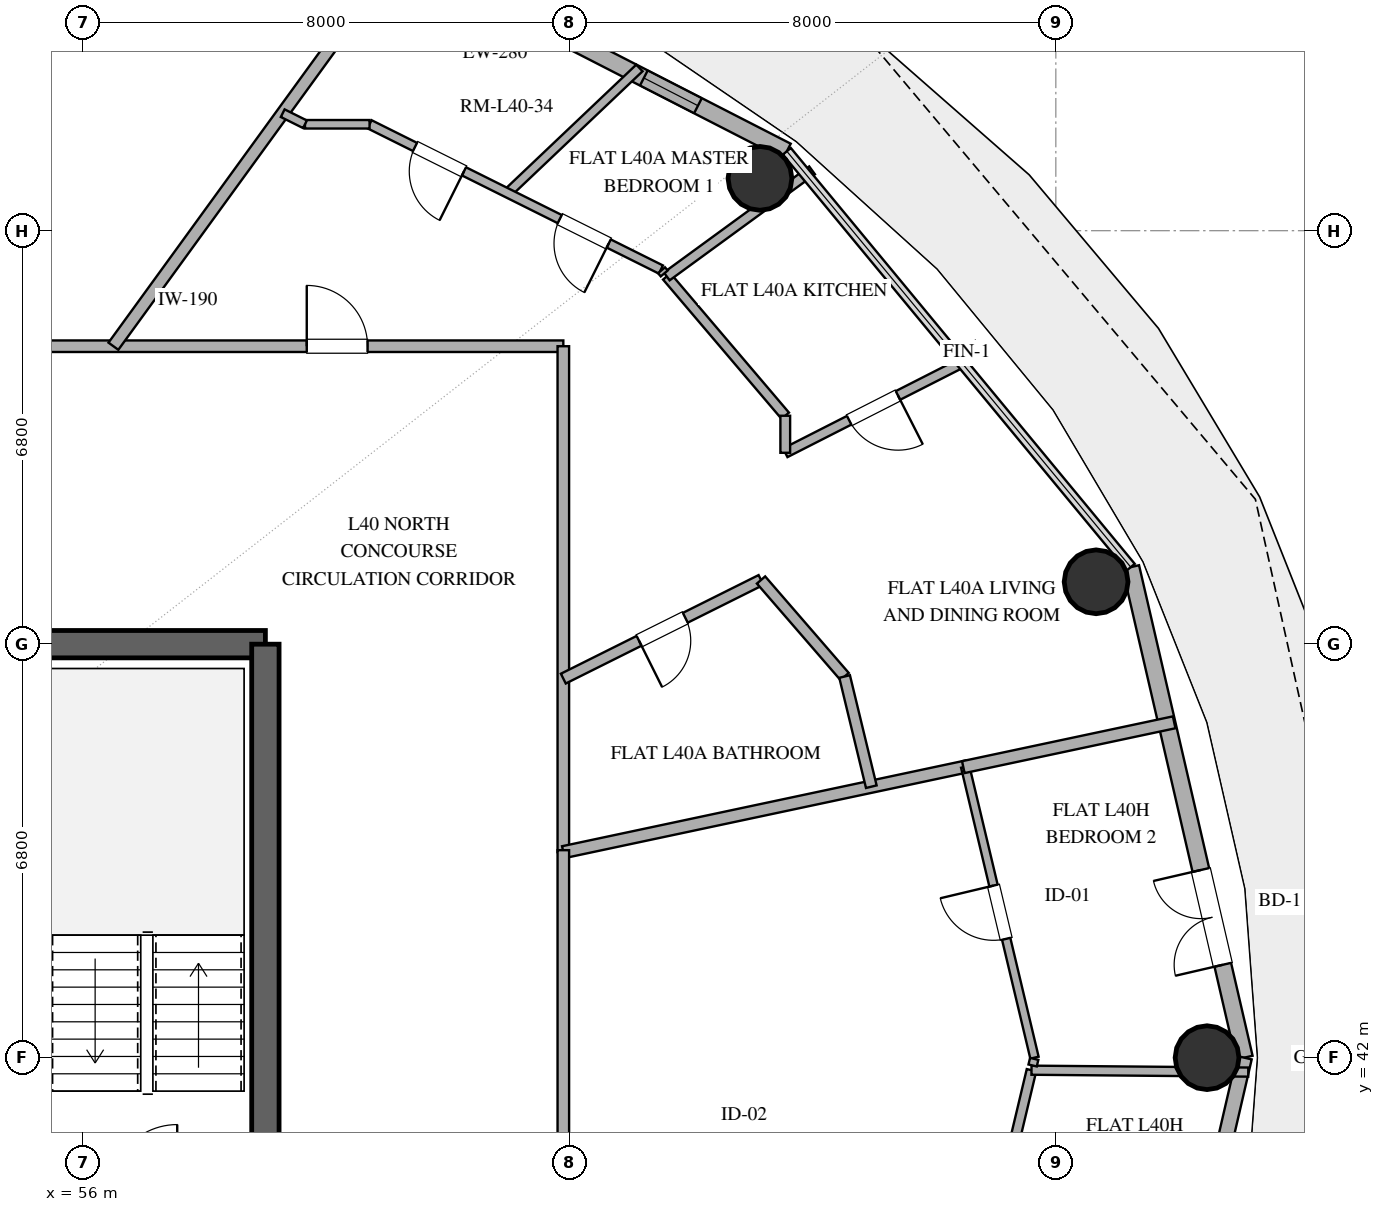
"""IFC4 building model, lengths in metres.
Left out: names, types, materials, properties, quantities, classifications, styles, units other than length and angle.
Written with IfcOpenShell. Run it as: python <this file> out.ifc"""

import sys

from ifc_helpers import new_model, si_unit, direction, frame, frame_2d, origin, origin_2d, place, context, subcontext, project, spatial, rectangle, hollow_circle, extrude, element, fill, save


model = new_model("IFC4")
c1 = context("Model", 3, precision=1e-05, world=origin(), true_north=direction((0.0, 1.0)))
c2 = subcontext(c1, "Body", "Model", "MODEL_VIEW")
j1 = project(units=[si_unit("LENGTHUNIT", "METRE"), si_unit("PLANEANGLEUNIT", "RADIAN")], contexts=[c1])
p1 = place(None, origin())
s1 = spatial("IfcSite", under=j1, at=p1, CompositionType="ELEMENT")
p2 = place(p1, origin())
s2 = spatial("IfcBuilding", under=s1, at=p2, CompositionType="ELEMENT")
p3 = place(p2, frame((0.0, 0.0, 161.4)))
s3 = spatial("IfcBuildingStorey", under=s2, at=p3, CompositionType="ELEMENT", Elevation=161.4)
p4 = place(p3, frame((55.0, 48.8, 0.0), z_axis=(0.0, 0.0, 1.0), x_axis=(1.0, 0.0, 0.0)))
e1 = element("IfcWall", 1, at=p4, inside=s3, PredefinedType="SHEAR", context=c2, shape_type="SweptSolid", body=[
    extrude(rectangle(XDim=4.0, YDim=0.45, at=frame_2d((2.0, 0.0))), origin(), (0.0, 0.0, 1.0), 3.38),
])
p5 = place(p3, frame((59.0, 35.2, 0.0), z_axis=(0.0, 0.0, 1.0), x_axis=(0.0, 1.0, 0.0)))
e2 = element("IfcWall", 2, at=p5, inside=s3, PredefinedType="SHEAR", context=c2, shape_type="SweptSolid", body=[
    extrude(rectangle(XDim=13.6, YDim=0.45, at=frame_2d((6.8, 0.0))), origin(), (0.0, 0.0, 1.0), 3.38),
])
for number, where, z_axis, x_axis in (
    (3, (74.487, 42.0, 0.0), (0.0, 0.0, 1.0), (1.0, 0.0, 0.0)),
    (4, (72.662, 49.826, 0.0), (0.0, 0.0, 1.0), (1.0, 0.0, 0.0)),
    (5, (67.134, 56.46, 0.0), (0.0, 0.0, 1.0), (1.0, 0.0, 0.0)),
):
    element("IfcColumn", number, at=place(p3, frame(where, z_axis=z_axis, x_axis=x_axis)), inside=s3, PredefinedType="COLUMN", context=c2, shape_type="SweptSolid", body=[
        extrude(hollow_circle(Radius=0.525, WallThickness=0.028, at=origin_2d()), origin(), (0.0, 0.0, 1.0), 3.38),
    ])
p6 = place(p3, frame((75.099, 42.0, 0.0), z_axis=(0.0, 0.0, 1.0), x_axis=(-0.225473184558, 0.974249374157, 0.0)))
e6 = element("IfcWall", 6, at=p6, inside=s3, PredefinedType="SOLIDWALL", context=c2, shape_type="SweptSolid", body=[
    extrude(rectangle(XDim=8.28, YDim=0.28, at=frame_2d((4.14, 0.0))), origin(), (0.0, 0.0, 1.0), 3.38),
])
p7 = place(p6, frame((1.568, 0.0, 0.0)))
e7 = element("IfcOpeningElement", 7, at=p7, cuts=e6, PredefinedType="OPENING", context=c2, shape_type="SweptSolid", body=[
    extrude(rectangle(XDim=1.6, YDim=2.25, at=frame_2d((0.8, 1.125))), frame((0.0, 0.15, 0.0), z_axis=(0.0, -1.0, 0.0), x_axis=(1.0, 0.0, 0.0)), (0.0, 0.0, 1.0), 0.3),
])
p8 = place(p3, frame((67.576, 56.906, 0.0), z_axis=(0.0, 0.0, 1.0), x_axis=(-0.889872523182, 0.456209263919, 0.0)))
e8 = element("IfcWall", 8, at=p8, inside=s3, PredefinedType="SOLIDWALL", context=c2, shape_type="SweptSolid", body=[
    extrude(rectangle(XDim=10.016, YDim=0.28, at=frame_2d((5.008, 0.0))), origin(), (0.0, 0.0, 1.0), 3.38),
])
p9 = place(p8, frame((4.213, 0.0, 0.85)))
e9 = element("IfcOpeningElement", 9, at=p9, cuts=e8, PredefinedType="OPENING", context=c2, shape_type="SweptSolid", body=[
    extrude(rectangle(XDim=1.5, YDim=2.0, at=frame_2d((0.75, 1.0))), frame((0.0, 0.15, 0.0), z_axis=(0.0, -1.0, 0.0), x_axis=(1.0, 0.0, 0.0)), (0.0, 0.0, 1.0), 0.3),
])
p10 = place(p8, frame((7.479, 0.0, 0.85)))
e10 = element("IfcOpeningElement", 10, at=p10, cuts=e8, PredefinedType="OPENING", context=c2, shape_type="SweptSolid", body=[
    extrude(rectangle(XDim=1.0, YDim=1.8, at=frame_2d((0.5, 0.9))), frame((0.0, 0.15, 0.0), z_axis=(0.0, -1.0, 0.0), x_axis=(1.0, 0.0, 0.0)), (0.0, 0.0, 1.0), 0.3),
])
p11 = place(p8, frame((1.643, 0.0, 0.85)))
e11 = element("IfcOpeningElement", 11, at=p11, cuts=e8, PredefinedType="OPENING", context=c2, shape_type="SweptSolid", body=[
    extrude(rectangle(XDim=1.0, YDim=1.8, at=frame_2d((0.5, 0.9))), frame((0.0, 0.15, 0.0), z_axis=(0.0, -1.0, 0.0), x_axis=(1.0, 0.0, 0.0)), (0.0, 0.0, 1.0), 0.3),
])
p12 = place(p3, frame((73.232, 33.933, 0.0), z_axis=(0.0, 0.0, 1.0), x_axis=(0.225473184558, 0.974249374157, 0.0)))
e12 = element("IfcWall", 12, at=p12, inside=s3, PredefinedType="SOLIDWALL", context=c2, shape_type="SweptSolid", body=[
    extrude(rectangle(XDim=8.28, YDim=0.25, at=frame_2d((4.14, 0.0))), origin(), (0.0, 0.0, 1.0), 3.38),
])
p13 = place(p12, frame((4.821, 0.0, 0.35)))
e13 = element("IfcOpeningElement", 13, at=p13, cuts=e12, PredefinedType="OPENING", context=c2, shape_type="SweptSolid", body=[
    extrude(rectangle(XDim=1.0, YDim=1.05, at=frame_2d((0.5, 0.525))), frame((0.0, 0.135, 0.0), z_axis=(0.0, -1.0, 0.0), x_axis=(1.0, 0.0, 0.0)), (0.0, 0.0, 1.0), 0.27),
])
p14 = place(p3, frame((51.543, 53.7, 0.0), z_axis=(0.0, 0.0, 1.0), x_axis=(1.0, 0.0, 0.0)))
e14 = element("IfcWall", 14, at=p14, inside=s3, PredefinedType="PARTITIONING", context=c2, shape_type="SweptSolid", body=[
    extrude(rectangle(XDim=12.356, YDim=0.19, at=frame_2d((6.178, 0.0))), origin(), (0.0, 0.0, 1.0), 2.74),
])
p15 = place(p14, frame((8.137, 0.0, 0.0)))
e15 = element("IfcOpeningElement", 15, at=p15, cuts=e14, PredefinedType="OPENING", context=c2, shape_type="SweptSolid", body=[
    extrude(rectangle(XDim=1.0, YDim=2.2, at=frame_2d((0.5, 1.1))), frame((0.0, 0.105, 0.0), z_axis=(0.0, -1.0, 0.0), x_axis=(1.0, 0.0, 0.0)), (0.0, 0.0, 1.0), 0.21),
])
p16 = place(p14, frame((1.998, 0.0, 0.0)))
e16 = element("IfcOpeningElement", 16, at=p16, cuts=e14, PredefinedType="OPENING", context=c2, shape_type="SweptSolid", body=[
    extrude(rectangle(XDim=1.0, YDim=2.2, at=frame_2d((0.5, 1.1))), frame((0.0, 0.105, 0.0), z_axis=(0.0, -1.0, 0.0), x_axis=(1.0, 0.0, 0.0)), (0.0, 0.0, 1.0), 0.21),
])
p17 = place(p3, frame((63.9, 53.7, 0.0), z_axis=(0.0, 0.0, 1.0), x_axis=(0.0, -1.0, 0.0)))
e17 = element("IfcWall", 17, at=p17, inside=s3, PredefinedType="PARTITIONING", context=c2, shape_type="SweptSolid", body=[
    extrude(rectangle(XDim=8.32, YDim=0.19, at=frame_2d((4.16, 0.0))), origin(), (0.0, 0.0, 1.0), 2.74),
])
p18 = place(p3, frame((63.9, 45.38, 0.0), z_axis=(0.0, 0.0, 1.0), x_axis=(0.978145779981, 0.207920256603, 0.0)))
e18 = element("IfcWall", 18, at=p18, inside=s3, PredefinedType="PARTITIONING", context=c2, shape_type="SweptSolid", body=[
    extrude(rectangle(XDim=6.789, YDim=0.2, at=frame_2d((3.395, 0.0))), origin(), (0.0, 0.0, 1.0), 2.74),
])
p19 = place(p3, frame((63.9, 45.412, 0.0), z_axis=(0.0, 0.0, 1.0), x_axis=(0.0, -1.0, 0.0)))
e19 = element("IfcWall", 19, at=p19, inside=s3, PredefinedType="PARTITIONING", context=c2, shape_type="SweptSolid", body=[
    extrude(rectangle(XDim=4.987, YDim=0.19, at=frame_2d((2.494, 0.0))), origin(), (0.0, 0.0, 1.0), 2.74),
])
p20 = place(p3, frame((71.649, 42.0, 0.0), z_axis=(0.0, 0.0, 1.0), x_axis=(-0.231622764326, 0.972805682059, 0.0)))
e20 = element("IfcWall", 20, at=p20, inside=s3, PredefinedType="PARTITIONING", context=c2, shape_type="SweptSolid", body=[
    extrude(rectangle(XDim=4.918, YDim=0.14, at=frame_2d((2.459, 0.0))), origin(), (0.0, 0.0, 1.0), 2.74),
])
p21 = place(p20, frame((2.009, 0.0, 0.0)))
e21 = element("IfcOpeningElement", 21, at=p21, cuts=e20, PredefinedType="OPENING", context=c2, shape_type="SweptSolid", body=[
    extrude(rectangle(XDim=0.9, YDim=2.1, at=frame_2d((0.45, 1.05))), frame((0.0, 0.08, 0.0), z_axis=(0.0, -1.0, 0.0), x_axis=(1.0, 0.0, 0.0)), (0.0, 0.0, 1.0), 0.16),
])
p22 = place(p3, frame((61.274, 60.27, 0.0), z_axis=(0.0, 0.0, 1.0), x_axis=(-0.587785528328, -0.809016793823, 0.0)))
e22 = element("IfcWall", 22, at=p22, inside=s3, PredefinedType="PARTITIONING", context=c2, shape_type="SweptSolid", body=[
    extrude(rectangle(XDim=8.121, YDim=0.2, at=frame_2d((4.061, 0.0))), origin(), (0.0, 0.0, 1.0), 2.74),
])
p23 = place(p3, frame((67.152, 49.856, 0.0), z_axis=(0.0, 0.0, 1.0), x_axis=(-0.894843352961, -0.446380301605, 0.0)))
e23 = element("IfcWall", 23, at=p23, inside=s3, PredefinedType="PLUMBINGWALL", context=c2, shape_type="SweptSolid", body=[
    extrude(rectangle(XDim=3.634, YDim=0.18, at=frame_2d((1.817, 0.0))), origin(), (0.0, 0.0, 1.0), 2.74),
])
p24 = place(p23, frame((1.392, 0.0, 0.0)))
e24 = element("IfcOpeningElement", 24, at=p24, cuts=e23, PredefinedType="OPENING", context=c2, shape_type="SweptSolid", body=[
    extrude(rectangle(XDim=0.85, YDim=2.1, at=frame_2d((0.425, 1.05))), frame((0.0, 0.1, 0.0), z_axis=(0.0, -1.0, 0.0), x_axis=(1.0, 0.0, 0.0)), (0.0, 0.0, 1.0), 0.2),
])
p25 = place(p3, frame((70.019, 35.158, 0.0), z_axis=(0.0, 0.0, 1.0), x_axis=(0.231657621012, 0.972797382103, 0.0)))
e25 = element("IfcWall", 25, at=p25, inside=s3, PredefinedType="PLUMBINGWALL", context=c2, shape_type="SweptSolid", body=[
    extrude(rectangle(XDim=6.822, YDim=0.16, at=frame_2d((3.411, 0.0))), origin(), (0.0, 0.0, 1.0), 2.74),
])
p26 = place(p25, frame((4.567, 0.0, 0.0)))
e26 = element("IfcOpeningElement", 26, at=p26, cuts=e25, PredefinedType="OPENING", context=c2, shape_type="SweptSolid", body=[
    extrude(rectangle(XDim=0.9, YDim=2.1, at=frame_2d((0.45, 1.05))), frame((0.0, 0.09, 0.0), z_axis=(0.0, -1.0, 0.0), x_axis=(1.0, 0.0, 0.0)), (0.0, 0.0, 1.0), 0.18),
])
p27 = place(p3, frame((75.165, 41.763, 0.0), z_axis=(0.0, 0.0, 1.0), x_axis=(-0.999962184605, 0.00869651424, 0.0)))
e27 = element("IfcWall", 27, at=p27, inside=s3, PredefinedType="PARTITIONING", context=c2, shape_type="SweptSolid", body=[
    extrude(rectangle(XDim=3.565, YDim=0.15, at=frame_2d((1.783, 0.0))), origin(), (0.0, 0.0, 1.0), 2.74),
])
p28 = place(p3, frame((73.946, 47.515, 0.0), z_axis=(0.0, 0.0, 1.0), x_axis=(-0.978135742848, -0.207967469966, 0.0)))
e28 = element("IfcWall", 28, at=p28, inside=s3, PredefinedType="PARTITIONING", context=c2, shape_type="SweptSolid", body=[
    extrude(rectangle(XDim=3.545, YDim=0.2, at=frame_2d((1.773, 0.0))), origin(), (0.0, 0.0, 1.0), 2.74),
])
p29 = place(p3, frame((70.562, 53.48, 0.0), z_axis=(0.0, 0.0, 1.0), x_axis=(-0.891269321093, -0.453474362317, 0.0)))
e29 = element("IfcWall", 29, at=p29, inside=s3, PredefinedType="PLUMBINGWALL", context=c2, shape_type="SweptSolid", body=[
    extrude(rectangle(XDim=3.379, YDim=0.16, at=frame_2d((1.689, 0.0))), origin(), (0.0, 0.0, 1.0), 2.74),
])
p30 = place(p29, frame((1.3, 0.0, 0.0)))
e30 = element("IfcOpeningElement", 30, at=p30, cuts=e29, PredefinedType="OPENING", context=c2, shape_type="SweptSolid", body=[
    extrude(rectangle(XDim=0.9, YDim=2.1, at=frame_2d((0.45, 1.05))), frame((0.0, 0.09, 0.0), z_axis=(0.0, -1.0, 0.0), x_axis=(1.0, 0.0, 0.0)), (0.0, 0.0, 1.0), 0.18),
])
p31 = place(p3, frame((67.55, 52.557, 0.0), z_axis=(0.0, 0.0, 1.0), x_axis=(-0.64791931309, 0.761708975742, 0.0)))
e31 = element("IfcWall", 31, at=p31, inside=s3, PredefinedType="PLUMBINGWALL", context=c2, shape_type="SweptSolid", body=[
    extrude(rectangle(XDim=3.008, YDim=0.16, at=frame_2d((1.504, 0.0))), origin(), (0.0, 0.0, 1.0), 2.74),
])
p32 = place(p3, frame((62.983, 56.219, 0.0), z_axis=(0.0, 0.0, 1.0), x_axis=(0.725364351486, 0.688365133918, 0.0)))
e32 = element("IfcWall", 32, at=p32, inside=s3, PredefinedType="PARTITIONING", context=c2, shape_type="SweptSolid", body=[
    extrude(rectangle(XDim=2.989, YDim=0.15, at=frame_2d((1.495, 0.0))), origin(), (0.0, 0.0, 1.0), 2.74),
])
p33 = place(p3, frame((65.601, 54.848, 0.0), z_axis=(0.0, 0.0, 1.0), x_axis=(0.807696422095, 0.589598583559, 0.0)))
e33 = element("IfcWall", 33, at=p33, inside=s3, PredefinedType="PLUMBINGWALL", context=c2, shape_type="SweptSolid", body=[
    extrude(rectangle(XDim=2.958, YDim=0.16, at=frame_2d((1.479, 0.0))), origin(), (0.0, 0.0, 1.0), 2.74),
])
p34 = place(p3, frame((65.505, 54.961, 0.0), z_axis=(0.0, 0.0, 1.0), x_axis=(-0.894955531207, 0.446155350929, 0.0)))
e34 = element("IfcWall", 34, at=p34, inside=s3, PredefinedType="PARTITIONING", context=c2, shape_type="SweptSolid", body=[
    extrude(rectangle(XDim=5.354, YDim=0.15, at=frame_2d((2.677, 0.0))), origin(), (0.0, 0.0, 1.0), 2.74),
])
p35 = place(p34, frame((0.959, 0.0, 0.0)))
e35 = element("IfcOpeningElement", 35, at=p35, cuts=e34, PredefinedType="OPENING", context=c2, shape_type="SweptSolid", body=[
    extrude(rectangle(XDim=0.9, YDim=2.1, at=frame_2d((0.45, 1.05))), frame((0.0, 0.085, 0.0), z_axis=(0.0, -1.0, 0.0), x_axis=(1.0, 0.0, 0.0)), (0.0, 0.0, 1.0), 0.17),
])
p36 = place(p34, frame((3.619, 0.0, 0.0)))
e36 = element("IfcOpeningElement", 36, at=p36, cuts=e34, PredefinedType="OPENING", context=c2, shape_type="SweptSolid", body=[
    extrude(rectangle(XDim=0.9, YDim=2.1, at=frame_2d((0.45, 1.05))), frame((0.0, 0.085, 0.0), z_axis=(0.0, -1.0, 0.0), x_axis=(1.0, 0.0, 0.0)), (0.0, 0.0, 1.0), 0.17),
])
p37 = place(p3, frame((68.526, 48.268, 0.0), z_axis=(0.0, 0.0, 1.0), x_axis=(-0.654594060889, 0.755980565524, 0.0)))
e37 = element("IfcWall", 37, at=p37, inside=s3, PredefinedType="PLUMBINGWALL", context=c2, shape_type="SweptSolid", body=[
    extrude(rectangle(XDim=2.1, YDim=0.18, at=frame_2d((1.05, 0.0))), origin(), (0.0, 0.0, 1.0), 2.74),
])
p38 = place(p3, frame((68.965, 46.456, 0.0), z_axis=(0.0, 0.0, 1.0), x_axis=(-0.235442613623, 0.971888252676, 0.0)))
e38 = element("IfcWall", 38, at=p38, inside=s3, PredefinedType="PLUMBINGWALL", context=c2, shape_type="SweptSolid", body=[
    extrude(rectangle(XDim=1.865, YDim=0.18, at=frame_2d((0.932, 0.0))), origin(), (0.0, 0.0, 1.0), 2.74),
])
p39 = place(p3, frame((59.651, 57.35, 0.0), z_axis=(0.0, 0.0, 1.0), x_axis=(1.0, 0.0, 0.0)))
e39 = element("IfcWall", 39, at=p39, inside=s3, PredefinedType="PARTITIONING", context=c2, shape_type="SweptSolid", body=[
    extrude(rectangle(XDim=1.062, YDim=0.14, at=frame_2d((0.531, 0.0))), origin(), (0.0, 0.0, 1.0), 2.74),
])
p40 = place(p3, frame((67.55, 51.948, 0.0), z_axis=(0.0, 0.0, 1.0), x_axis=(0.0, 1.0, 0.0)))
e40 = element("IfcWall", 40, at=p40, inside=s3, PredefinedType="PLUMBINGWALL", context=c2, shape_type="SweptSolid", body=[
    extrude(rectangle(XDim=0.609, YDim=0.16, at=frame_2d((0.305, 0.0))), origin(), (0.0, 0.0, 1.0), 2.74),
])
p41 = place(p3, frame((59.285, 57.532, 0.0), z_axis=(0.0, 0.0, 1.0), x_axis=(0.895142158028, -0.445780794698, 0.0)))
e41 = element("IfcWall", 41, at=p41, inside=s3, PredefinedType="PARTITIONING", context=c2, shape_type="SweptSolid", body=[
    extrude(rectangle(XDim=0.409, YDim=0.14, at=frame_2d((0.205, 0.0))), origin(), (0.0, 0.0, 1.0), 2.74),
])
p42 = place(p3, frame((71.618, 41.872, 0.0), z_axis=(0.0, 0.0, 1.0), x_axis=(0.233786115402, 0.972288050037, 0.0)))
e42 = element("IfcWall", 42, at=p42, inside=s3, PredefinedType="PARTITIONING", context=c2, shape_type="SweptSolid", body=[
    extrude(rectangle(XDim=0.112, YDim=0.14, at=frame_2d((0.056, 0.0))), origin(), (0.0, 0.0, 1.0), 2.74),
])
p43 = place(p3, frame((65.56, 54.897, 0.0), z_axis=(0.0, 0.0, 1.0), x_axis=(-0.6481623323, 0.761502193685, 0.0)))
e43 = element("IfcWall", 43, at=p43, inside=s3, PredefinedType="PARTITIONING", context=c2, shape_type="SweptSolid", body=[
    extrude(rectangle(XDim=0.069, YDim=0.15, at=frame_2d((0.034, 0.0))), origin(), (0.0, 0.0, 1.0), 2.74),
])
p44 = place(p7, origin())
e44 = element("IfcDoor", 44, at=p44, inside=s3, OperationType="DOUBLE_DOOR_SINGLE_SWING", PredefinedType="DOOR", context=c2, shape_type="SweptSolid", body=[
    extrude(rectangle(XDim=1.6, YDim=2.25, at=frame_2d((0.8, 1.125))), frame((0.0, 0.025, 0.0), z_axis=(0.0, -1.0, 0.0), x_axis=(1.0, 0.0, 0.0)), (0.0, 0.0, 1.0), 0.05),
])
fill(e7, e44)
p45 = place(p11, origin())
e45 = element("IfcWindow", 45, at=p45, inside=s3, PartitioningType="SINGLE_PANEL", PredefinedType="WINDOW", context=c2, shape_type="SweptSolid", body=[
    extrude(rectangle(XDim=1.0, YDim=1.8, at=frame_2d((0.5, 0.9))), frame((0.0, 0.03, 0.0), z_axis=(0.0, -1.0, 0.0), x_axis=(1.0, 0.0, 0.0)), (0.0, 0.0, 1.0), 0.06),
])
fill(e11, e45)
p46 = place(p15, origin())
e46 = element("IfcDoor", 46, at=p46, inside=s3, OperationType="SINGLE_SWING_LEFT", PredefinedType="DOOR", context=c2, shape_type="SweptSolid", body=[
    extrude(rectangle(XDim=1.0, YDim=2.2, at=frame_2d((0.5, 1.1))), frame((0.0, 0.025, 0.0), z_axis=(0.0, -1.0, 0.0), x_axis=(1.0, 0.0, 0.0)), (0.0, 0.0, 1.0), 0.05),
])
fill(e15, e46)
p47 = place(p21, origin())
e47 = element("IfcDoor", 47, at=p47, inside=s3, OperationType="SINGLE_SWING_RIGHT", PredefinedType="DOOR", context=c2, shape_type="SweptSolid", body=[
    extrude(rectangle(XDim=0.9, YDim=2.1, at=frame_2d((0.45, 1.05))), frame((0.0, 0.025, 0.0), z_axis=(0.0, -1.0, 0.0), x_axis=(1.0, 0.0, 0.0)), (0.0, 0.0, 1.0), 0.05),
])
fill(e21, e47)
p48 = place(p24, origin())
e48 = element("IfcDoor", 48, at=p48, inside=s3, OperationType="SINGLE_SWING_RIGHT", PredefinedType="DOOR", context=c2, shape_type="SweptSolid", body=[
    extrude(rectangle(XDim=0.85, YDim=2.1, at=frame_2d((0.425, 1.05))), frame((0.0, 0.025, 0.0), z_axis=(0.0, -1.0, 0.0), x_axis=(1.0, 0.0, 0.0)), (0.0, 0.0, 1.0), 0.05),
])
fill(e24, e48)
p49 = place(p30, origin())
e49 = element("IfcDoor", 49, at=p49, inside=s3, OperationType="SINGLE_SWING_LEFT", PredefinedType="DOOR", context=c2, shape_type="SweptSolid", body=[
    extrude(rectangle(XDim=0.9, YDim=2.1, at=frame_2d((0.45, 1.05))), frame((0.0, 0.025, 0.0), z_axis=(0.0, -1.0, 0.0), x_axis=(1.0, 0.0, 0.0)), (0.0, 0.0, 1.0), 0.05),
])
fill(e30, e49)
p50 = place(p35, origin())
e50 = element("IfcDoor", 50, at=p50, inside=s3, OperationType="SINGLE_SWING_LEFT", PredefinedType="DOOR", context=c2, shape_type="SweptSolid", body=[
    extrude(rectangle(XDim=0.9, YDim=2.1, at=frame_2d((0.45, 1.05))), frame((0.0, 0.025, 0.0), z_axis=(0.0, -1.0, 0.0), x_axis=(1.0, 0.0, 0.0)), (0.0, 0.0, 1.0), 0.05),
])
fill(e35, e50)
p51 = place(p36, origin())
e51 = element("IfcDoor", 51, at=p51, inside=s3, OperationType="SINGLE_SWING_LEFT", PredefinedType="DOOR", context=c2, shape_type="SweptSolid", body=[
    extrude(rectangle(XDim=0.9, YDim=2.1, at=frame_2d((0.45, 1.05))), frame((0.0, 0.025, 0.0), z_axis=(0.0, -1.0, 0.0), x_axis=(1.0, 0.0, 0.0)), (0.0, 0.0, 1.0), 0.05),
])
fill(e36, e51)
save(model, sys.argv[1])
